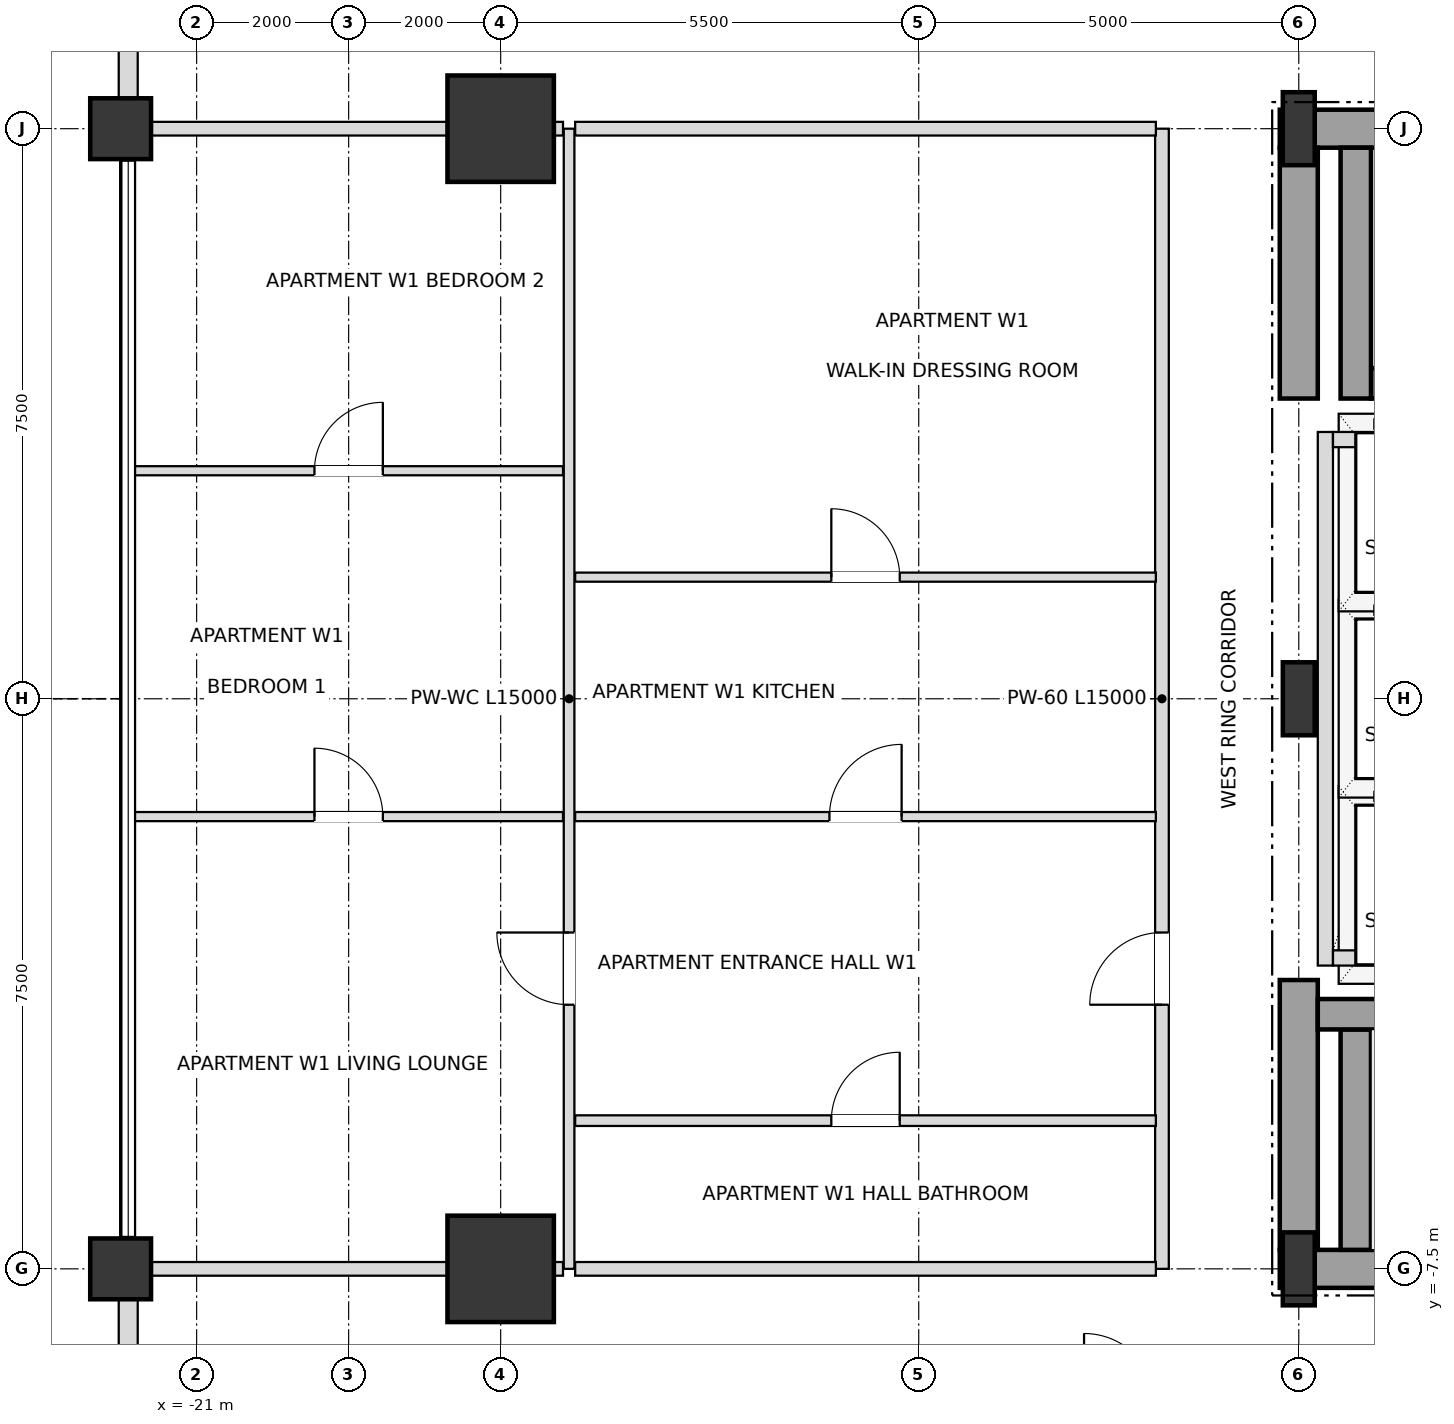
"""IFC4 building model, lengths in metres.
Left out: names, types, materials, properties, quantities, classifications, styles, units other than length and angle.
Written with IfcOpenShell. Run it as: python <this file> out.ifc"""

import sys

from ifc_helpers import new_model, si_unit, direction, frame, frame_2d, origin, origin_2d, place, context, subcontext, project, spatial, rectangle, i_section, extrude, element, fill, save


model = new_model("IFC4")
c1 = context("Model", 3, precision=1e-05, world=origin(), true_north=direction((0.0, 1.0)))
c2 = subcontext(c1, "Body", "Model", "MODEL_VIEW")
j1 = project(units=[si_unit("LENGTHUNIT", "METRE"), si_unit("PLANEANGLEUNIT", "RADIAN")], contexts=[c1])
p1 = place(None, origin())
s1 = spatial("IfcSite", under=j1, at=p1, CompositionType="ELEMENT")
p2 = place(p1, origin())
s2 = spatial("IfcBuilding", under=s1, at=p2, CompositionType="ELEMENT")
p3 = place(p2, frame((0.0, 0.0, 61.2)))
s3 = spatial("IfcBuildingStorey", under=s2, at=p3, CompositionType="ELEMENT", Elevation=61.2)
for number, where, z_axis, x_axis in (
    (1, (-6.5, -7.5, 0.0), (0.0, 0.0, 1.0), (1.0, 0.0, 0.0)),
    (2, (-6.5, 0.0, 0.0), (0.0, 0.0, 1.0), (1.0, 0.0, 0.0)),
    (3, (-6.5, 7.5, 0.0), (0.0, 0.0, 1.0), (1.0, 0.0, 0.0)),
):
    element("IfcColumn", number, at=place(p3, frame(where, z_axis=z_axis, x_axis=x_axis)), inside=s3, PredefinedType="COLUMN", context=c2, shape_type="SweptSolid", body=[
        extrude(i_section(OverallWidth=0.42, OverallDepth=0.96, WebThickness=0.022, FlangeThickness=0.034, at=origin_2d()), origin(), (0.0, 0.0, 1.0), 3.6),
    ])
for number, where, z_axis, x_axis in (
    (4, (-17.0, 7.5, 0.0), (0.0, 0.0, 1.0), (1.0, 0.0, 0.0)),
    (5, (-17.0, -7.5, 0.0), (0.0, 0.0, 1.0), (1.0, 0.0, 0.0)),
):
    element("IfcColumn", number, at=place(p3, frame(where, z_axis=z_axis, x_axis=x_axis)), inside=s3, PredefinedType="USERDEFINED", context=c2, shape_type="SweptSolid", body=[
        extrude(rectangle(XDim=1.4, YDim=1.4, at=origin_2d()), origin(), (0.0, 0.0, 1.0), 3.6),
    ])
for number, where, z_axis, x_axis in (
    (6, (-22.0, -7.5, 0.0), (0.0, 0.0, 1.0), (1.0, 0.0, 0.0)),
    (7, (-22.0, 7.5, 0.0), (0.0, 0.0, 1.0), (1.0, 0.0, 0.0)),
):
    element("IfcColumn", number, at=place(p3, frame(where, z_axis=z_axis, x_axis=x_axis)), inside=s3, PredefinedType="COLUMN", context=c2, shape_type="SweptSolid", body=[
        extrude(rectangle(XDim=0.8, YDim=0.8, at=origin_2d()), origin(), (0.0, 0.0, 1.0), 3.6),
    ])
p4 = place(p3, frame((-21.9, 12.605, 0.0), z_axis=(0.0, 0.0, 1.0), x_axis=(0.0, -1.0, 0.0)))
e8 = element("IfcWall", 8, at=p4, inside=s3, PredefinedType="SOLIDWALL", context=c2, shape_type="SweptSolid", body=[
    extrude(rectangle(XDim=4.71, YDim=0.25, at=frame_2d((2.355, 0.0))), origin(), (0.0, 0.0, 1.0), 2.736),
])
p5 = place(p4, frame((1.455, 0.0, 0.72)))
e9 = element("IfcOpeningElement", 9, at=p5, cuts=e8, PredefinedType="OPENING", context=c2, shape_type="SweptSolid", body=[
    extrude(rectangle(XDim=1.8, YDim=1.68, at=frame_2d((0.9, 0.84))), frame((0.0, 0.135, 0.0), z_axis=(0.0, -1.0, 0.0), x_axis=(1.0, 0.0, 0.0)), (0.0, 0.0, 1.0), 0.27),
])
p6 = place(p3, frame((-21.9, -7.895, 0.0), z_axis=(0.0, 0.0, 1.0), x_axis=(0.0, -1.0, 0.0)))
e10 = element("IfcWall", 10, at=p6, inside=s3, PredefinedType="SOLIDWALL", context=c2, shape_type="SweptSolid", body=[
    extrude(rectangle(XDim=4.71, YDim=0.25, at=frame_2d((2.355, 0.0))), origin(), (0.0, 0.0, 1.0), 2.736),
])
p7 = place(p6, frame((1.455, 0.0, 0.72)))
e11 = element("IfcOpeningElement", 11, at=p7, cuts=e10, PredefinedType="OPENING", context=c2, shape_type="SweptSolid", body=[
    extrude(rectangle(XDim=1.8, YDim=1.68, at=frame_2d((0.9, 0.84))), frame((0.0, 0.135, 0.0), z_axis=(0.0, -1.0, 0.0), x_axis=(1.0, 0.0, 0.0)), (0.0, 0.0, 1.0), 0.27),
])
p8 = place(p3, frame((-6.75, -7.5, 0.0), z_axis=(0.0, 0.0, 1.0), x_axis=(1.0, 0.0, 0.0)))
e12 = element("IfcWall", 12, at=p8, inside=s3, PredefinedType="SHEAR", context=c2, shape_type="SweptSolid", body=[
    extrude(rectangle(XDim=6.75, YDim=0.5, at=frame_2d((3.375, 0.0))), origin(), (0.0, 0.0, 1.0), 3.38),
])
p9 = place(p3, frame((-6.75, 7.5, 0.0), z_axis=(0.0, 0.0, 1.0), x_axis=(1.0, 0.0, 0.0)))
e13 = element("IfcWall", 13, at=p9, inside=s3, PredefinedType="SHEAR", context=c2, shape_type="SweptSolid", body=[
    extrude(rectangle(XDim=6.75, YDim=0.5, at=frame_2d((3.375, 0.0))), origin(), (0.0, 0.0, 1.0), 3.38),
])
p10 = place(p9, frame((1.65, 0.0, 0.0)))
e14 = element("IfcOpeningElement", 14, at=p10, cuts=e13, PredefinedType="OPENING", context=c2, shape_type="SweptSolid", body=[
    extrude(rectangle(XDim=1.05, YDim=2.15, at=frame_2d((0.525, 1.075))), frame((0.0, 0.26, 0.0), z_axis=(0.0, -1.0, 0.0), x_axis=(1.0, 0.0, 0.0)), (0.0, 0.0, 1.0), 0.52),
])
p11 = place(p3, frame((-6.5, -7.25, 0.0), z_axis=(0.0, 0.0, 1.0), x_axis=(0.0, 1.0, 0.0)))
e15 = element("IfcWall", 15, at=p11, inside=s3, PredefinedType="SHEAR", context=c2, shape_type="SweptSolid", body=[
    extrude(rectangle(XDim=3.55, YDim=0.5, at=frame_2d((1.775, 0.0))), origin(), (0.0, 0.0, 1.0), 3.38),
])
p12 = place(p3, frame((-6.5, 3.95, 0.0), z_axis=(0.0, 0.0, 1.0), x_axis=(0.0, 1.0, 0.0)))
e16 = element("IfcWall", 16, at=p12, inside=s3, PredefinedType="SHEAR", context=c2, shape_type="SweptSolid", body=[
    extrude(rectangle(XDim=3.3, YDim=0.5, at=frame_2d((1.65, 0.0))), origin(), (0.0, 0.0, 1.0), 3.38),
])
p13 = place(p3, frame((-5.75, -7.25, 0.0), z_axis=(0.0, 0.0, 1.0), x_axis=(0.0, 1.0, 0.0)))
e17 = element("IfcWall", 17, at=p13, inside=s3, PredefinedType="SHEAR", context=c2, shape_type="SweptSolid", body=[
    extrude(rectangle(XDim=2.9, YDim=0.4, at=frame_2d((1.45, 0.0))), origin(), (0.0, 0.0, 1.0), 3.38),
])
p14 = place(p3, frame((-6.25, -4.15, 0.0), z_axis=(0.0, 0.0, 1.0), x_axis=(1.0, 0.0, 0.0)))
e18 = element("IfcWall", 18, at=p14, inside=s3, PredefinedType="SHEAR", context=c2, shape_type="SweptSolid", body=[
    extrude(rectangle(XDim=7.78, YDim=0.4, at=frame_2d((3.89, 0.0))), origin(), (0.0, 0.0, 1.0), 3.38),
])
p15 = place(p3, frame((-5.55, 4.15, 0.0), z_axis=(0.0, 0.0, 1.0), x_axis=(1.0, 0.0, 0.0)))
e19 = element("IfcWall", 19, at=p15, inside=s3, PredefinedType="SHEAR", context=c2, shape_type="SweptSolid", body=[
    extrude(rectangle(XDim=7.08, YDim=0.4, at=frame_2d((3.54, 0.0))), origin(), (0.0, 0.0, 1.0), 3.38),
])
p16 = place(p3, frame((-5.75, 3.95, 0.0), z_axis=(0.0, 0.0, 1.0), x_axis=(0.0, 1.0, 0.0)))
e20 = element("IfcWall", 20, at=p16, inside=s3, PredefinedType="SHEAR", context=c2, shape_type="SweptSolid", body=[
    extrude(rectangle(XDim=3.3, YDim=0.4, at=frame_2d((1.65, 0.0))), origin(), (0.0, 0.0, 1.0), 3.38),
])
p17 = place(p3, frame((-6.15, -3.51, 0.0), z_axis=(0.0, 0.0, 1.0), x_axis=(0.0, 1.0, 0.0)))
e21 = element("IfcWall", 21, at=p17, inside=s3, PredefinedType="SOLIDWALL", context=c2, shape_type="SweptSolid", body=[
    extrude(rectangle(XDim=7.02, YDim=0.2, at=frame_2d((3.51, 0.0))), origin(), (0.0, 0.0, 1.0), 3.38),
])
for number, where, z_axis, x_axis in (
    (22, (-6.05, -3.41, 0.0), (0.0, 0.0, 1.0), (1.0, 0.0, 0.0)),
    (23, (-6.05, 3.41, 0.0), (0.0, 0.0, 1.0), (1.0, 0.0, 0.0)),
):
    element("IfcWall", number, at=place(p3, frame(where, z_axis=z_axis, x_axis=x_axis)), inside=s3, PredefinedType="SOLIDWALL", context=c2, shape_type="SweptSolid", body=[
        extrude(rectangle(XDim=2.2, YDim=0.2, at=frame_2d((1.1, 0.0))), origin(), (0.0, 0.0, 1.0), 3.38),
    ])
p18 = place(p3, frame((-16.1, -7.5, 0.0), z_axis=(0.0, 0.0, 1.0), x_axis=(0.0, 1.0, 0.0)))
e24 = element("IfcWall", 24, at=p18, inside=s3, PredefinedType="PARTITIONING", context=c2, shape_type="SweptSolid", body=[
    extrude(rectangle(XDim=15.0, YDim=0.14, at=frame_2d((7.5, 0.0))), origin(), (0.0, 0.0, 1.0), 3.38),
])
p19 = place(p18, frame((3.475, 0.0, 0.0)))
e25 = element("IfcOpeningElement", 25, at=p19, cuts=e24, PredefinedType="OPENING", context=c2, shape_type="SweptSolid", body=[
    extrude(rectangle(XDim=0.95, YDim=2.1, at=frame_2d((0.475, 1.05))), frame((0.0, 0.08, 0.0), z_axis=(0.0, -1.0, 0.0), x_axis=(1.0, 0.0, 0.0)), (0.0, 0.0, 1.0), 0.16),
])
p20 = place(p3, frame((-8.3, -7.5, 0.0), z_axis=(0.0, 0.0, 1.0), x_axis=(0.0, 1.0, 0.0)))
e26 = element("IfcWall", 26, at=p20, inside=s3, PredefinedType="PARTITIONING", context=c2, shape_type="SweptSolid", body=[
    extrude(rectangle(XDim=15.0, YDim=0.18, at=frame_2d((7.5, 0.0))), origin(), (0.0, 0.0, 1.0), 3.38),
])
p21 = place(p20, frame((3.475, 0.0, 0.0)))
e27 = element("IfcOpeningElement", 27, at=p21, cuts=e26, PredefinedType="OPENING", context=c2, shape_type="SweptSolid", body=[
    extrude(rectangle(XDim=0.95, YDim=2.15, at=frame_2d((0.475, 1.075))), frame((0.0, 0.1, 0.0), z_axis=(0.0, -1.0, 0.0), x_axis=(1.0, 0.0, 0.0)), (0.0, 0.0, 1.0), 0.2),
])
p22 = place(p3, frame((-21.9, -7.5, 0.0), z_axis=(0.0, 0.0, 1.0), x_axis=(1.0, 0.0, 0.0)))
e28 = element("IfcWall", 28, at=p22, inside=s3, PredefinedType="PARTITIONING", context=c2, shape_type="SweptSolid", body=[
    extrude(rectangle(XDim=5.72, YDim=0.18, at=frame_2d((2.86, 0.0))), origin(), (0.0, 0.0, 1.0), 2.816),
])
p23 = place(p3, frame((-16.02, -7.5, 0.0), z_axis=(0.0, 0.0, 1.0), x_axis=(1.0, 0.0, 0.0)))
e29 = element("IfcWall", 29, at=p23, inside=s3, PredefinedType="PARTITIONING", context=c2, shape_type="SweptSolid", body=[
    extrude(rectangle(XDim=7.64, YDim=0.18, at=frame_2d((3.82, 0.0))), origin(), (0.0, 0.0, 1.0), 2.816),
])
p24 = place(p3, frame((-16.02, -5.55, 0.0), z_axis=(0.0, 0.0, 1.0), x_axis=(1.0, 0.0, 0.0)))
e30 = element("IfcWall", 30, at=p24, inside=s3, PredefinedType="PARTITIONING", context=c2, shape_type="SweptSolid", body=[
    extrude(rectangle(XDim=7.64, YDim=0.14, at=frame_2d((3.82, 0.0))), origin(), (0.0, 0.0, 1.0), 2.948),
])
p25 = place(p24, frame((3.37, 0.0, 0.0)))
e31 = element("IfcOpeningElement", 31, at=p25, cuts=e30, PredefinedType="OPENING", context=c2, shape_type="SweptSolid", body=[
    extrude(rectangle(XDim=0.9, YDim=2.1, at=frame_2d((0.45, 1.05))), frame((0.0, 0.08, 0.0), z_axis=(0.0, -1.0, 0.0), x_axis=(1.0, 0.0, 0.0)), (0.0, 0.0, 1.0), 0.16),
])
p26 = place(p3, frame((-21.82, -1.55, 0.0), z_axis=(0.0, 0.0, 1.0), x_axis=(1.0, 0.0, 0.0)))
e32 = element("IfcWall", 32, at=p26, inside=s3, PredefinedType="PARTITIONING", context=c2, shape_type="SweptSolid", body=[
    extrude(rectangle(XDim=5.64, YDim=0.12, at=frame_2d((2.82, 0.0))), origin(), (0.0, 0.0, 1.0), 2.816),
])
p27 = place(p26, frame((2.37, 0.0, 0.0)))
e33 = element("IfcOpeningElement", 33, at=p27, cuts=e32, PredefinedType="OPENING", context=c2, shape_type="SweptSolid", body=[
    extrude(rectangle(XDim=0.9, YDim=2.1, at=frame_2d((0.45, 1.05))), frame((0.0, 0.07, 0.0), z_axis=(0.0, -1.0, 0.0), x_axis=(1.0, 0.0, 0.0)), (0.0, 0.0, 1.0), 0.14),
])
p28 = place(p3, frame((-16.02, -1.55, 0.0), z_axis=(0.0, 0.0, 1.0), x_axis=(1.0, 0.0, 0.0)))
e34 = element("IfcWall", 34, at=p28, inside=s3, PredefinedType="PARTITIONING", context=c2, shape_type="SweptSolid", body=[
    extrude(rectangle(XDim=7.64, YDim=0.12, at=frame_2d((3.82, 0.0))), origin(), (0.0, 0.0, 1.0), 2.948),
])
p29 = place(p28, frame((3.345, 0.0, 0.0)))
e35 = element("IfcOpeningElement", 35, at=p29, cuts=e34, PredefinedType="OPENING", context=c2, shape_type="SweptSolid", body=[
    extrude(rectangle(XDim=0.95, YDim=2.1, at=frame_2d((0.475, 1.05))), frame((0.0, 0.07, 0.0), z_axis=(0.0, -1.0, 0.0), x_axis=(1.0, 0.0, 0.0)), (0.0, 0.0, 1.0), 0.14),
])
p30 = place(p3, frame((-16.02, 1.6, 0.0), z_axis=(0.0, 0.0, 1.0), x_axis=(1.0, 0.0, 0.0)))
e36 = element("IfcWall", 36, at=p30, inside=s3, PredefinedType="PARTITIONING", context=c2, shape_type="SweptSolid", body=[
    extrude(rectangle(XDim=7.64, YDim=0.12, at=frame_2d((3.82, 0.0))), origin(), (0.0, 0.0, 1.0), 2.948),
])
p31 = place(p30, frame((3.37, 0.0, 0.0)))
e37 = element("IfcOpeningElement", 37, at=p31, cuts=e36, PredefinedType="OPENING", context=c2, shape_type="SweptSolid", body=[
    extrude(rectangle(XDim=0.9, YDim=2.1, at=frame_2d((0.45, 1.05))), frame((0.0, 0.07, 0.0), z_axis=(0.0, -1.0, 0.0), x_axis=(1.0, 0.0, 0.0)), (0.0, 0.0, 1.0), 0.14),
])
p32 = place(p3, frame((-21.82, 3.0, 0.0), z_axis=(0.0, 0.0, 1.0), x_axis=(1.0, 0.0, 0.0)))
e38 = element("IfcWall", 38, at=p32, inside=s3, PredefinedType="PARTITIONING", context=c2, shape_type="SweptSolid", body=[
    extrude(rectangle(XDim=5.64, YDim=0.12, at=frame_2d((2.82, 0.0))), origin(), (0.0, 0.0, 1.0), 2.816),
])
p33 = place(p32, frame((2.37, 0.0, 0.0)))
e39 = element("IfcOpeningElement", 39, at=p33, cuts=e38, PredefinedType="OPENING", context=c2, shape_type="SweptSolid", body=[
    extrude(rectangle(XDim=0.9, YDim=2.1, at=frame_2d((0.45, 1.05))), frame((0.0, 0.07, 0.0), z_axis=(0.0, -1.0, 0.0), x_axis=(1.0, 0.0, 0.0)), (0.0, 0.0, 1.0), 0.14),
])
p34 = place(p3, frame((-21.9, 7.5, 0.0), z_axis=(0.0, 0.0, 1.0), x_axis=(1.0, 0.0, 0.0)))
e40 = element("IfcWall", 40, at=p34, inside=s3, PredefinedType="PARTITIONING", context=c2, shape_type="SweptSolid", body=[
    extrude(rectangle(XDim=5.72, YDim=0.18, at=frame_2d((2.86, 0.0))), origin(), (0.0, 0.0, 1.0), 2.816),
])
p35 = place(p3, frame((-16.02, 7.5, 0.0), z_axis=(0.0, 0.0, 1.0), x_axis=(1.0, 0.0, 0.0)))
e41 = element("IfcWall", 41, at=p35, inside=s3, PredefinedType="PARTITIONING", context=c2, shape_type="SweptSolid", body=[
    extrude(rectangle(XDim=7.64, YDim=0.18, at=frame_2d((3.82, 0.0))), origin(), (0.0, 0.0, 1.0), 2.816),
])
p36 = place(p25, origin())
e42 = element("IfcDoor", 42, at=p36, inside=s3, OperationType="SINGLE_SWING_RIGHT", PredefinedType="DOOR", context=c2, shape_type="SweptSolid", body=[
    extrude(rectangle(XDim=0.9, YDim=2.1, at=frame_2d((0.45, 1.05))), frame((0.0, 0.025, 0.0), z_axis=(0.0, -1.0, 0.0), x_axis=(1.0, 0.0, 0.0)), (0.0, 0.0, 1.0), 0.05),
])
fill(e31, e42)
p37 = place(p21, origin())
e43 = element("IfcDoor", 43, at=p37, inside=s3, OperationType="SINGLE_SWING_LEFT", PredefinedType="DOOR", context=c2, shape_type="SweptSolid", body=[
    extrude(rectangle(XDim=0.95, YDim=2.15, at=frame_2d((0.475, 1.075))), frame((0.0, 0.025, 0.0), z_axis=(0.0, -1.0, 0.0), x_axis=(1.0, 0.0, 0.0)), (0.0, 0.0, 1.0), 0.05),
])
fill(e27, e43)
p38 = place(p29, origin())
e44 = element("IfcDoor", 44, at=p38, inside=s3, OperationType="SINGLE_SWING_RIGHT", PredefinedType="DOOR", context=c2, shape_type="SweptSolid", body=[
    extrude(rectangle(XDim=0.95, YDim=2.1, at=frame_2d((0.475, 1.05))), frame((0.0, 0.025, 0.0), z_axis=(0.0, -1.0, 0.0), x_axis=(1.0, 0.0, 0.0)), (0.0, 0.0, 1.0), 0.05),
])
fill(e35, e44)
p39 = place(p31, origin())
e45 = element("IfcDoor", 45, at=p39, inside=s3, OperationType="SINGLE_SWING_LEFT", PredefinedType="DOOR", context=c2, shape_type="SweptSolid", body=[
    extrude(rectangle(XDim=0.9, YDim=2.1, at=frame_2d((0.45, 1.05))), frame((0.0, 0.025, 0.0), z_axis=(0.0, -1.0, 0.0), x_axis=(1.0, 0.0, 0.0)), (0.0, 0.0, 1.0), 0.05),
])
fill(e37, e45)
p40 = place(p19, origin())
e46 = element("IfcDoor", 46, at=p40, inside=s3, OperationType="SINGLE_SWING_RIGHT", PredefinedType="DOOR", context=c2, shape_type="SweptSolid", body=[
    extrude(rectangle(XDim=0.95, YDim=2.1, at=frame_2d((0.475, 1.05))), frame((0.0, 0.025, 0.0), z_axis=(0.0, -1.0, 0.0), x_axis=(1.0, 0.0, 0.0)), (0.0, 0.0, 1.0), 0.05),
])
fill(e25, e46)
p41 = place(p27, origin())
e47 = element("IfcDoor", 47, at=p41, inside=s3, OperationType="SINGLE_SWING_LEFT", PredefinedType="DOOR", context=c2, shape_type="SweptSolid", body=[
    extrude(rectangle(XDim=0.9, YDim=2.1, at=frame_2d((0.45, 1.05))), frame((0.0, 0.025, 0.0), z_axis=(0.0, -1.0, 0.0), x_axis=(1.0, 0.0, 0.0)), (0.0, 0.0, 1.0), 0.05),
])
fill(e33, e47)
p42 = place(p33, origin())
e48 = element("IfcDoor", 48, at=p42, inside=s3, OperationType="SINGLE_SWING_RIGHT", PredefinedType="DOOR", context=c2, shape_type="SweptSolid", body=[
    extrude(rectangle(XDim=0.9, YDim=2.1, at=frame_2d((0.45, 1.05))), frame((0.0, 0.025, 0.0), z_axis=(0.0, -1.0, 0.0), x_axis=(1.0, 0.0, 0.0)), (0.0, 0.0, 1.0), 0.05),
])
fill(e39, e48)
save(model, sys.argv[1])
